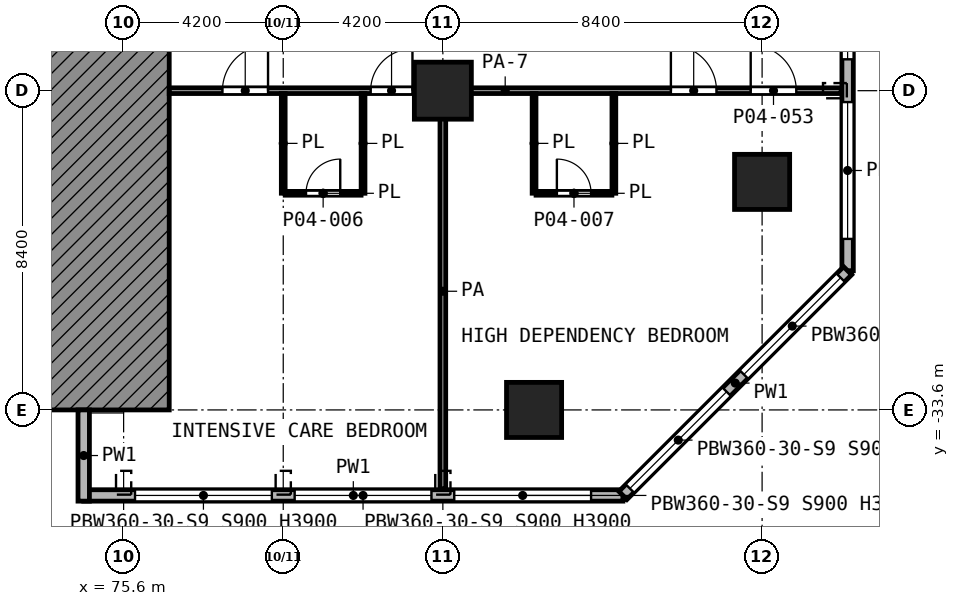
"""IFC4 building model, lengths in metres.
Left out: names, types, materials, properties, quantities, classifications, styles, units other than length and angle.
Written with IfcOpenShell. Run it as: python <this file> out.ifc"""

import sys

from ifc_helpers import new_model, si_unit, direction, frame, frame_2d, origin, origin_2d, place, context, subcontext, project, spatial, polyline, rectangle, outline, extrude, element, fill, save


model = new_model("IFC4")
c1 = context("Model", 3, precision=1e-05, world=origin(), true_north=direction((0.0, 1.0)))
c2 = subcontext(c1, "Body", "Model", "MODEL_VIEW")
j1 = project(units=[si_unit("LENGTHUNIT", "METRE"), si_unit("PLANEANGLEUNIT", "RADIAN")], contexts=[c1])
p1 = place(None, origin())
s1 = spatial("IfcSite", under=j1, at=p1, CompositionType="ELEMENT")
p2 = place(p1, origin())
s2 = spatial("IfcBuilding", under=s1, at=p2, CompositionType="ELEMENT")
p3 = place(p2, frame((0.0, 0.0, 18.2)))
s3 = spatial("IfcBuildingStorey", under=s2, at=p3, CompositionType="ELEMENT", Elevation=18.2)
p4 = place(p3, frame((84.0, -25.2, 0.0), z_axis=(0.0, 0.0, 1.0), x_axis=(1.0, 0.0, 0.0)))
e1 = element("IfcColumn", 1, at=p4, inside=s3, PredefinedType="COLUMN", context=c2, shape_type="SweptSolid", body=[
    extrude(rectangle(XDim=1.5, YDim=1.5, at=origin_2d()), origin(), (0.0, 0.0, 1.0), 5.6),
])
for number, where, z_axis, x_axis in (
    (2, (92.4, -27.6, 0.0), (0.0, 0.0, 1.0), (1.0, 0.0, 0.0)),
    (3, (86.4, -33.6, 0.0), (0.0, 0.0, 1.0), (1.0, 0.0, 0.0)),
):
    element("IfcColumn", number, at=place(p3, frame(where, z_axis=z_axis, x_axis=x_axis)), inside=s3, PredefinedType="COLUMN", context=c2, shape_type="SweptSolid", body=[
        extrude(rectangle(XDim=1.45, YDim=1.45, at=origin_2d()), origin(), (0.0, 0.0, 1.0), 5.6),
    ])
p5 = place(p3, frame((0.0, 0.0, -18.2), z_axis=(0.0, -1.0, 0.0), x_axis=(1.0, 0.0, 0.0)))
e4 = element("IfcWall", 4, at=p5, inside=s3, PredefinedType="SHEAR", context=c2, shape_type="SweptSolid", body=[
    extrude(outline(polyline([(76.8, 23.25), (76.8, 18.2), (71.462, 18.2), (70.576, 19.406), (68.994, 21.022), (67.2, 22.4), (67.2, 23.25), (76.8, 23.25)])), origin(), (0.0, 0.0, 1.0), 33.6),
])
p6 = place(p3, frame((94.65, -29.938, 0.0), z_axis=(0.0, 0.0, 1.0), x_axis=(0.0, 1.0, 0.0)))
e5 = element("IfcWall", 5, at=p6, inside=s3, PredefinedType="SOLIDWALL", context=c2, shape_type="SweptSolid", body=[
    extrude(rectangle(XDim=26.276, YDim=0.3, at=frame_2d((13.138, 0.0))), origin(), (0.0, 0.0, 1.0), 5.05),
])
p7 = place(p6, frame((0.838, 0.0, 0.9)))
e6 = element("IfcOpeningElement", 6, at=p7, cuts=e5, PredefinedType="OPENING", context=c2, shape_type="SweptSolid", body=[
    extrude(rectangle(XDim=3.6, YDim=3.0, at=frame_2d((1.8, 1.5))), frame((0.0, 0.16, 0.0), z_axis=(0.0, -1.0, 0.0), x_axis=(1.0, 0.0, 0.0)), (0.0, 0.0, 1.0), 0.32),
])
p8 = place(p6, frame((5.563, 0.0, 0.9)))
e7 = element("IfcOpeningElement", 7, at=p8, cuts=e5, PredefinedType="OPENING", context=c2, shape_type="SweptSolid", body=[
    extrude(rectangle(XDim=1.2, YDim=3.0, at=frame_2d((0.6, 1.5))), frame((0.0, 0.16, 0.0), z_axis=(0.0, -1.0, 0.0), x_axis=(1.0, 0.0, 0.0)), (0.0, 0.0, 1.0), 0.32),
])
p9 = place(p6, frame((9.238, 0.0, 0.9)))
e8 = element("IfcOpeningElement", 8, at=p9, cuts=e5, PredefinedType="OPENING", context=c2, shape_type="SweptSolid", body=[
    extrude(rectangle(XDim=3.6, YDim=3.0, at=frame_2d((1.8, 1.5))), frame((0.0, 0.16, 0.0), z_axis=(0.0, -1.0, 0.0), x_axis=(1.0, 0.0, 0.0)), (0.0, 0.0, 1.0), 0.32),
])
p10 = place(p6, frame((13.438, 0.0, 0.9)))
e9 = element("IfcOpeningElement", 9, at=p10, cuts=e5, PredefinedType="OPENING", context=c2, shape_type="SweptSolid", body=[
    extrude(rectangle(XDim=3.6, YDim=3.0, at=frame_2d((1.8, 1.5))), frame((0.0, 0.16, 0.0), z_axis=(0.0, -1.0, 0.0), x_axis=(1.0, 0.0, 0.0)), (0.0, 0.0, 1.0), 0.32),
])
p11 = place(p6, frame((19.513, 0.0, 0.9)))
e10 = element("IfcOpeningElement", 10, at=p11, cuts=e5, PredefinedType="OPENING", context=c2, shape_type="SweptSolid", body=[
    extrude(rectangle(XDim=1.2, YDim=3.0, at=frame_2d((0.6, 1.5))), frame((0.0, 0.16, 0.0), z_axis=(0.0, -1.0, 0.0), x_axis=(1.0, 0.0, 0.0)), (0.0, 0.0, 1.0), 0.32),
])
p12 = place(p6, frame((21.838, 0.0, 0.9)))
e11 = element("IfcOpeningElement", 11, at=p12, cuts=e5, PredefinedType="OPENING", context=c2, shape_type="SweptSolid", body=[
    extrude(rectangle(XDim=3.6, YDim=3.0, at=frame_2d((1.8, 1.5))), frame((0.0, 0.16, 0.0), z_axis=(0.0, -1.0, 0.0), x_axis=(1.0, 0.0, 0.0)), (0.0, 0.0, 1.0), 0.32),
])
p13 = place(p3, frame((74.55, -33.6, 0.0), z_axis=(0.0, 0.0, 1.0), x_axis=(0.0, -1.0, 0.0)))
e12 = element("IfcWall", 12, at=p13, inside=s3, PredefinedType="SOLIDWALL", context=c2, shape_type="SweptSolid", body=[
    extrude(rectangle(XDim=2.4, YDim=0.3, at=frame_2d((1.2, 0.0))), origin(), (0.0, 0.0, 1.0), 5.05),
])
p14 = place(p3, frame((74.55, -35.85, 0.0), z_axis=(0.0, 0.0, 1.0), x_axis=(1.0, 0.0, 0.0)))
e13 = element("IfcWall", 13, at=p14, inside=s3, PredefinedType="SOLIDWALL", context=c2, shape_type="SweptSolid", body=[
    extrude(rectangle(XDim=14.188, YDim=0.3, at=frame_2d((7.094, 0.0))), origin(), (0.0, 0.0, 1.0), 5.05),
])
p15 = place(p14, frame((1.35, 0.0, 0.9)))
e14 = element("IfcOpeningElement", 14, at=p15, cuts=e13, PredefinedType="OPENING", context=c2, shape_type="SweptSolid", body=[
    extrude(rectangle(XDim=3.6, YDim=3.0, at=frame_2d((1.8, 1.5))), frame((0.0, 0.16, 0.0), z_axis=(0.0, -1.0, 0.0), x_axis=(1.0, 0.0, 0.0)), (0.0, 0.0, 1.0), 0.32),
])
p16 = place(p14, frame((5.55, 0.0, 0.9)))
e15 = element("IfcOpeningElement", 15, at=p16, cuts=e13, PredefinedType="OPENING", context=c2, shape_type="SweptSolid", body=[
    extrude(rectangle(XDim=3.6, YDim=3.0, at=frame_2d((1.8, 1.5))), frame((0.0, 0.16, 0.0), z_axis=(0.0, -1.0, 0.0), x_axis=(1.0, 0.0, 0.0)), (0.0, 0.0, 1.0), 0.32),
])
p17 = place(p14, frame((9.75, 0.0, 0.9)))
e16 = element("IfcOpeningElement", 16, at=p17, cuts=e13, PredefinedType="OPENING", context=c2, shape_type="SweptSolid", body=[
    extrude(rectangle(XDim=3.6, YDim=3.0, at=frame_2d((1.8, 1.5))), frame((0.0, 0.16, 0.0), z_axis=(0.0, -1.0, 0.0), x_axis=(1.0, 0.0, 0.0)), (0.0, 0.0, 1.0), 0.32),
])
p18 = place(p3, frame((88.738, -35.85, 0.0), z_axis=(0.0, 0.0, 1.0), x_axis=(0.707106781187, 0.707106781187, 0.0)))
e17 = element("IfcWall", 17, at=p18, inside=s3, PredefinedType="SOLIDWALL", context=c2, shape_type="SweptSolid", body=[
    extrude(rectangle(XDim=8.361, YDim=0.3, at=frame_2d((4.181, 0.0))), origin(), (0.0, 0.0, 1.0), 5.05),
])
p19 = place(p18, frame((0.259, 0.0, 0.9)))
e18 = element("IfcOpeningElement", 18, at=p19, cuts=e17, PredefinedType="OPENING", context=c2, shape_type="SweptSolid", body=[
    extrude(rectangle(XDim=3.6, YDim=3.0, at=frame_2d((1.8, 1.5))), frame((0.0, 0.16, 0.0), z_axis=(0.0, -1.0, 0.0), x_axis=(1.0, 0.0, 0.0)), (0.0, 0.0, 1.0), 0.32),
])
p20 = place(p18, frame((4.502, 0.0, 0.9)))
e19 = element("IfcOpeningElement", 19, at=p20, cuts=e17, PredefinedType="OPENING", context=c2, shape_type="SweptSolid", body=[
    extrude(rectangle(XDim=3.6, YDim=3.0, at=frame_2d((1.8, 1.5))), frame((0.0, 0.16, 0.0), z_axis=(0.0, -1.0, 0.0), x_axis=(1.0, 0.0, 0.0)), (0.0, 0.0, 1.0), 0.32),
])
p21 = place(p3, frame((79.852, -27.9, 0.0), z_axis=(0.0, 0.0, 1.0), x_axis=(1.0, 0.0, 0.0)))
e20 = element("IfcWall", 20, at=p21, inside=s3, PredefinedType="PARTITIONING", context=c2, shape_type="SweptSolid", body=[
    extrude(rectangle(XDim=1.996, YDim=0.1, at=frame_2d((0.998, 0.0))), origin(), (0.0, 0.0, 1.0), 5.05),
])
p22 = place(p21, frame((0.548, 0.0, 0.0)))
e21 = element("IfcOpeningElement", 21, at=p22, cuts=e20, PredefinedType="OPENING", context=c2, shape_type="SweptSolid", body=[
    extrude(rectangle(XDim=0.9, YDim=2.1, at=frame_2d((0.45, 1.05))), frame((0.0, 0.06, 0.0), z_axis=(0.0, -1.0, 0.0), x_axis=(1.0, 0.0, 0.0)), (0.0, 0.0, 1.0), 0.12),
])
p23 = place(p3, frame((86.452, -27.9, 0.0), z_axis=(0.0, 0.0, 1.0), x_axis=(1.0, 0.0, 0.0)))
e22 = element("IfcWall", 22, at=p23, inside=s3, PredefinedType="PARTITIONING", context=c2, shape_type="SweptSolid", body=[
    extrude(rectangle(XDim=1.996, YDim=0.1, at=frame_2d((0.998, 0.0))), origin(), (0.0, 0.0, 1.0), 5.05),
])
p24 = place(p23, frame((0.548, 0.0, 0.0)))
e23 = element("IfcOpeningElement", 23, at=p24, cuts=e22, PredefinedType="OPENING", context=c2, shape_type="SweptSolid", body=[
    extrude(rectangle(XDim=0.9, YDim=2.1, at=frame_2d((0.45, 1.05))), frame((0.0, 0.06, 0.0), z_axis=(0.0, -1.0, 0.0), x_axis=(1.0, 0.0, 0.0)), (0.0, 0.0, 1.0), 0.12),
])
p25 = place(p3, frame((79.8, -27.898, 0.0), z_axis=(0.0, 0.0, 1.0), x_axis=(0.0, 1.0, 0.0)))
e24 = element("IfcWall", 24, at=p25, inside=s3, PredefinedType="PARTITIONING", context=c2, shape_type="SweptSolid", body=[
    extrude(rectangle(XDim=2.623, YDim=0.1, at=frame_2d((1.312, 0.0))), origin(), (0.0, 0.0, 1.0), 5.05),
])
p26 = place(p3, frame((81.9, -27.899, 0.0), z_axis=(0.0, 0.0, 1.0), x_axis=(0.0, 1.0, 0.0)))
e25 = element("IfcWall", 25, at=p26, inside=s3, PredefinedType="PARTITIONING", context=c2, shape_type="SweptSolid", body=[
    extrude(rectangle(XDim=2.624, YDim=0.1, at=frame_2d((1.312, 0.0))), origin(), (0.0, 0.0, 1.0), 5.05),
])
p27 = place(p3, frame((86.4, -27.898, 0.0), z_axis=(0.0, 0.0, 1.0), x_axis=(0.0, 1.0, 0.0)))
e26 = element("IfcWall", 26, at=p27, inside=s3, PredefinedType="PARTITIONING", context=c2, shape_type="SweptSolid", body=[
    extrude(rectangle(XDim=2.623, YDim=0.1, at=frame_2d((1.312, 0.0))), origin(), (0.0, 0.0, 1.0), 5.05),
])
p28 = place(p3, frame((88.5, -27.899, 0.0), z_axis=(0.0, 0.0, 1.0), x_axis=(0.0, 1.0, 0.0)))
e27 = element("IfcWall", 27, at=p28, inside=s3, PredefinedType="PARTITIONING", context=c2, shape_type="SweptSolid", body=[
    extrude(rectangle(XDim=2.624, YDim=0.1, at=frame_2d((1.312, 0.0))), origin(), (0.0, 0.0, 1.0), 5.05),
])
p29 = place(p3, frame((76.8, -25.2, 0.0), z_axis=(0.0, 0.0, 1.0), x_axis=(1.0, 0.0, 0.0)))
e28 = element("IfcWall", 28, at=p29, inside=s3, PredefinedType="PARTITIONING", context=c2, shape_type="SweptSolid", body=[
    extrude(rectangle(XDim=17.68, YDim=0.15, at=frame_2d((8.84, 0.0))), origin(), (0.0, 0.0, 1.0), 3.65),
])
p30 = place(p29, frame((1.4, 0.0, 0.0)))
e29 = element("IfcOpeningElement", 29, at=p30, cuts=e28, PredefinedType="OPENING", context=c2, shape_type="SweptSolid", body=[
    extrude(rectangle(XDim=1.2, YDim=2.1, at=frame_2d((0.6, 1.05))), frame((0.0, 0.085, 0.0), z_axis=(0.0, -1.0, 0.0), x_axis=(1.0, 0.0, 0.0)), (0.0, 0.0, 1.0), 0.17),
])
p31 = place(p29, frame((5.3, 0.0, 0.0)))
e30 = element("IfcOpeningElement", 30, at=p31, cuts=e28, PredefinedType="OPENING", context=c2, shape_type="SweptSolid", body=[
    extrude(rectangle(XDim=1.1, YDim=2.1, at=frame_2d((0.55, 1.05))), frame((0.0, 0.085, 0.0), z_axis=(0.0, -1.0, 0.0), x_axis=(1.0, 0.0, 0.0)), (0.0, 0.0, 1.0), 0.17),
])
p32 = place(p29, frame((15.3, 0.0, 0.0)))
e31 = element("IfcOpeningElement", 31, at=p32, cuts=e28, PredefinedType="OPENING", context=c2, shape_type="SweptSolid", body=[
    extrude(rectangle(XDim=1.2, YDim=2.1, at=frame_2d((0.6, 1.05))), frame((0.0, 0.085, 0.0), z_axis=(0.0, -1.0, 0.0), x_axis=(1.0, 0.0, 0.0)), (0.0, 0.0, 1.0), 0.17),
])
p33 = place(p29, frame((13.2, 0.0, 0.0)))
e32 = element("IfcOpeningElement", 32, at=p33, cuts=e28, PredefinedType="OPENING", context=c2, shape_type="SweptSolid", body=[
    extrude(rectangle(XDim=1.2, YDim=2.1, at=frame_2d((0.6, 1.05))), frame((0.0, 0.085, 0.0), z_axis=(0.0, -1.0, 0.0), x_axis=(1.0, 0.0, 0.0)), (0.0, 0.0, 1.0), 0.17),
])
p34 = place(p3, frame((84.0, -35.68, 0.0), z_axis=(0.0, 0.0, 1.0), x_axis=(0.0, 1.0, 0.0)))
e33 = element("IfcWall", 33, at=p34, inside=s3, PredefinedType="PARTITIONING", context=c2, shape_type="SweptSolid", body=[
    extrude(rectangle(XDim=10.405, YDim=0.15, at=frame_2d((5.203, 0.0))), origin(), (0.0, 0.0, 1.0), 5.05),
])
p35 = place(p7, origin())
e34 = element("IfcWindow", 34, at=p35, inside=s3, PartitioningType="SINGLE_PANEL", PredefinedType="WINDOW", context=c2, shape_type="SweptSolid", body=[
    extrude(rectangle(XDim=3.6, YDim=3.0, at=frame_2d((1.8, 1.5))), frame((0.0, 0.03, 0.0), z_axis=(0.0, -1.0, 0.0), x_axis=(1.0, 0.0, 0.0)), (0.0, 0.0, 1.0), 0.06),
])
fill(e6, e34)
p36 = place(p8, origin())
e35 = element("IfcWindow", 35, at=p36, inside=s3, PartitioningType="SINGLE_PANEL", PredefinedType="WINDOW", context=c2, shape_type="SweptSolid", body=[
    extrude(rectangle(XDim=1.2, YDim=3.0, at=frame_2d((0.6, 1.5))), frame((0.0, 0.03, 0.0), z_axis=(0.0, -1.0, 0.0), x_axis=(1.0, 0.0, 0.0)), (0.0, 0.0, 1.0), 0.06),
])
fill(e7, e35)
p37 = place(p15, origin())
e36 = element("IfcWindow", 36, at=p37, inside=s3, PartitioningType="SINGLE_PANEL", PredefinedType="WINDOW", context=c2, shape_type="SweptSolid", body=[
    extrude(rectangle(XDim=3.6, YDim=3.0, at=frame_2d((1.8, 1.5))), frame((0.0, 0.03, 0.0), z_axis=(0.0, -1.0, 0.0), x_axis=(1.0, 0.0, 0.0)), (0.0, 0.0, 1.0), 0.06),
])
fill(e14, e36)
p38 = place(p16, origin())
e37 = element("IfcWindow", 37, at=p38, inside=s3, PartitioningType="SINGLE_PANEL", PredefinedType="WINDOW", context=c2, shape_type="SweptSolid", body=[
    extrude(rectangle(XDim=3.6, YDim=3.0, at=frame_2d((1.8, 1.5))), frame((0.0, 0.03, 0.0), z_axis=(0.0, -1.0, 0.0), x_axis=(1.0, 0.0, 0.0)), (0.0, 0.0, 1.0), 0.06),
])
fill(e15, e37)
p39 = place(p17, origin())
e38 = element("IfcWindow", 38, at=p39, inside=s3, PartitioningType="SINGLE_PANEL", PredefinedType="WINDOW", context=c2, shape_type="SweptSolid", body=[
    extrude(rectangle(XDim=3.6, YDim=3.0, at=frame_2d((1.8, 1.5))), frame((0.0, 0.03, 0.0), z_axis=(0.0, -1.0, 0.0), x_axis=(1.0, 0.0, 0.0)), (0.0, 0.0, 1.0), 0.06),
])
fill(e16, e38)
p40 = place(p19, origin())
e39 = element("IfcWindow", 39, at=p40, inside=s3, PartitioningType="SINGLE_PANEL", PredefinedType="WINDOW", context=c2, shape_type="SweptSolid", body=[
    extrude(rectangle(XDim=3.6, YDim=3.0, at=frame_2d((1.8, 1.5))), frame((0.0, 0.03, 0.0), z_axis=(0.0, -1.0, 0.0), x_axis=(1.0, 0.0, 0.0)), (0.0, 0.0, 1.0), 0.06),
])
fill(e18, e39)
p41 = place(p20, origin())
e40 = element("IfcWindow", 40, at=p41, inside=s3, PartitioningType="SINGLE_PANEL", PredefinedType="WINDOW", context=c2, shape_type="SweptSolid", body=[
    extrude(rectangle(XDim=3.6, YDim=3.0, at=frame_2d((1.8, 1.5))), frame((0.0, 0.03, 0.0), z_axis=(0.0, -1.0, 0.0), x_axis=(1.0, 0.0, 0.0)), (0.0, 0.0, 1.0), 0.06),
])
fill(e19, e40)
p42 = place(p30, origin())
e41 = element("IfcDoor", 41, at=p42, inside=s3, OperationType="SINGLE_SWING_RIGHT", PredefinedType="DOOR", context=c2, shape_type="SweptSolid", body=[
    extrude(rectangle(XDim=1.2, YDim=2.1, at=frame_2d((0.6, 1.05))), frame((0.0, 0.025, 0.0), z_axis=(0.0, -1.0, 0.0), x_axis=(1.0, 0.0, 0.0)), (0.0, 0.0, 1.0), 0.05),
])
fill(e29, e41)
p43 = place(p31, origin())
e42 = element("IfcDoor", 42, at=p43, inside=s3, OperationType="SINGLE_SWING_RIGHT", PredefinedType="DOOR", context=c2, shape_type="SweptSolid", body=[
    extrude(rectangle(XDim=1.1, YDim=2.1, at=frame_2d((0.55, 1.05))), frame((0.0, 0.025, 0.0), z_axis=(0.0, -1.0, 0.0), x_axis=(1.0, 0.0, 0.0)), (0.0, 0.0, 1.0), 0.05),
])
fill(e30, e42)
p44 = place(p22, origin())
e43 = element("IfcDoor", 43, at=p44, inside=s3, OperationType="SINGLE_SWING_RIGHT", PredefinedType="DOOR", context=c2, shape_type="SweptSolid", body=[
    extrude(rectangle(XDim=0.9, YDim=2.1, at=frame_2d((0.45, 1.05))), frame((0.0, 0.025, 0.0), z_axis=(0.0, -1.0, 0.0), x_axis=(1.0, 0.0, 0.0)), (0.0, 0.0, 1.0), 0.05),
])
fill(e21, e43)
p45 = place(p32, origin())
e44 = element("IfcDoor", 44, at=p45, inside=s3, OperationType="SINGLE_SWING_LEFT", PredefinedType="DOOR", context=c2, shape_type="SweptSolid", body=[
    extrude(rectangle(XDim=1.2, YDim=2.1, at=frame_2d((0.6, 1.05))), frame((0.0, 0.025, 0.0), z_axis=(0.0, -1.0, 0.0), x_axis=(1.0, 0.0, 0.0)), (0.0, 0.0, 1.0), 0.05),
])
fill(e31, e44)
p46 = place(p33, origin())
e45 = element("IfcDoor", 45, at=p46, inside=s3, OperationType="SINGLE_SWING_LEFT", PredefinedType="DOOR", context=c2, shape_type="SweptSolid", body=[
    extrude(rectangle(XDim=1.2, YDim=2.1, at=frame_2d((0.6, 1.05))), frame((0.0, 0.025, 0.0), z_axis=(0.0, -1.0, 0.0), x_axis=(1.0, 0.0, 0.0)), (0.0, 0.0, 1.0), 0.05),
])
fill(e32, e45)
p47 = place(p24, origin())
e46 = element("IfcDoor", 46, at=p47, inside=s3, OperationType="SINGLE_SWING_LEFT", PredefinedType="DOOR", context=c2, shape_type="SweptSolid", body=[
    extrude(rectangle(XDim=0.9, YDim=2.1, at=frame_2d((0.45, 1.05))), frame((0.0, 0.025, 0.0), z_axis=(0.0, -1.0, 0.0), x_axis=(1.0, 0.0, 0.0)), (0.0, 0.0, 1.0), 0.05),
])
fill(e23, e46)
save(model, sys.argv[1])
